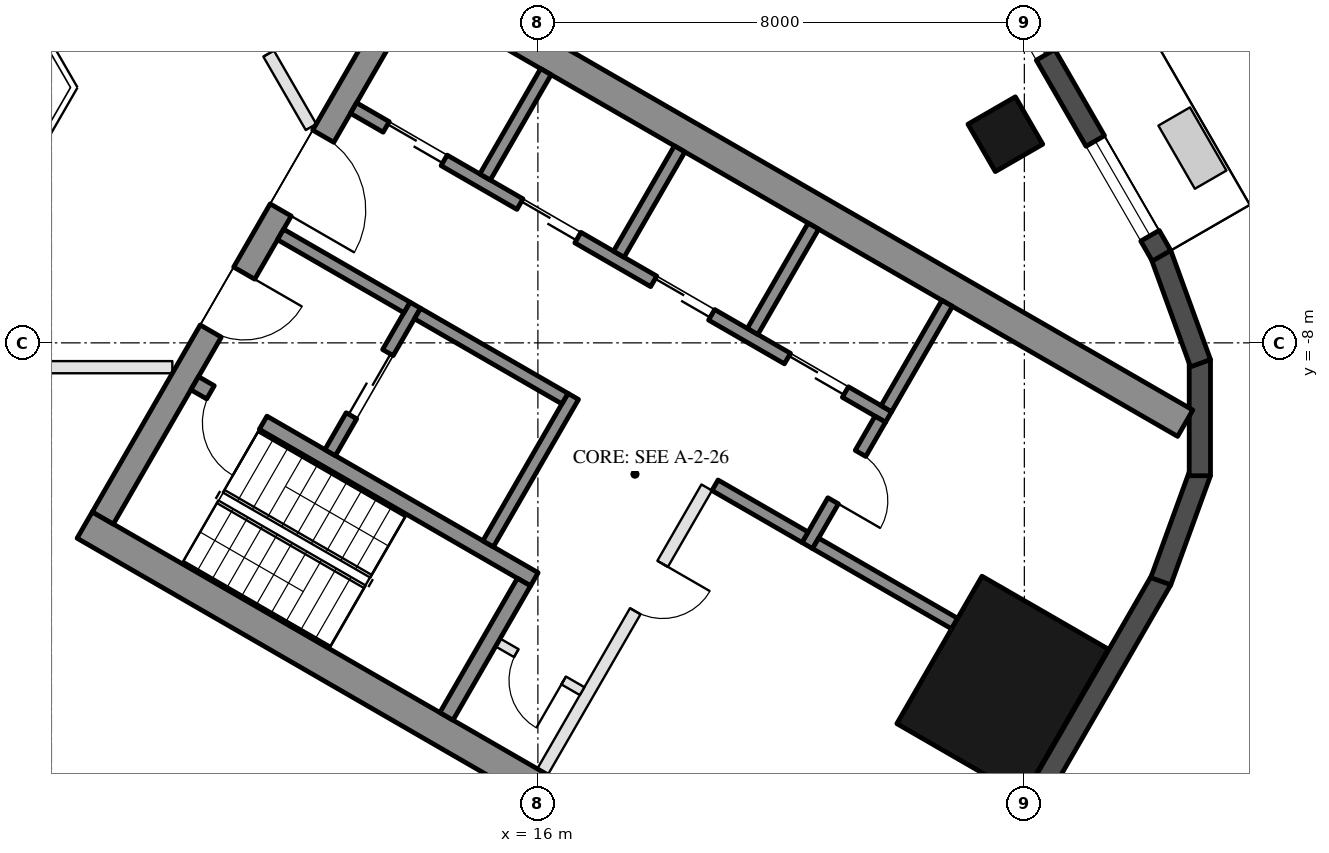
"""IFC4 building model, lengths in metres.
Left out: names, types, materials, properties, quantities, classifications, styles, units other than length and angle.
Written with IfcOpenShell. Run it as: python <this file> out.ifc"""

import sys

from ifc_helpers import new_model, si_unit, direction, frame, frame_2d, origin, origin_2d, place, context, subcontext, project, spatial, rectangle, hollow_rectangle, extrude, element, fill, save


model = new_model("IFC4")
c1 = context("Model", 3, precision=1e-05, world=origin(), true_north=direction((0.0, 1.0)))
c2 = subcontext(c1, "Body", "Model", "MODEL_VIEW")
j1 = project(units=[si_unit("LENGTHUNIT", "METRE"), si_unit("PLANEANGLEUNIT", "RADIAN")], contexts=[c1])
p1 = place(None, origin())
s1 = spatial("IfcSite", under=j1, at=p1, CompositionType="ELEMENT")
p2 = place(p1, origin())
s2 = spatial("IfcBuilding", under=s1, at=p2, CompositionType="ELEMENT")
p3 = place(p2, frame((0.0, 0.0, 116.8)))
s3 = spatial("IfcBuildingStorey", under=s2, at=p3, CompositionType="ELEMENT", Elevation=116.8)
p4 = place(p3, frame((23.688, -4.568, 0.0), z_axis=(0.0, 0.0, 1.0), x_axis=(-0.5, 0.866025403784, 0.0)))
e1 = element("IfcColumn", 1, at=p4, inside=s3, PredefinedType="COLUMN", context=c2, shape_type="SweptSolid", body=[
    extrude(hollow_rectangle(XDim=0.9, YDim=0.9, WallThickness=0.04, at=origin_2d()), origin(), (0.0, 0.0, 1.0), 3.7),
])
p5 = place(p3, frame((23.643, -13.65, 0.0), z_axis=(0.0, 0.0, 1.0), x_axis=(0.5, 0.866025403784, 0.0)))
e2 = element("IfcColumn", 2, at=p5, inside=s3, PredefinedType="COLUMN", context=c2, shape_type="SweptSolid", body=[
    extrude(hollow_rectangle(XDim=2.8, YDim=2.4, WallThickness=0.07, at=origin_2d()), origin(), (0.0, 0.0, 1.0), 3.7),
])
p6 = place(p3, frame((23.427, -16.792, 0.0), z_axis=(0.0, 0.0, 1.0), x_axis=(0.500018773155, 0.866014564827, 0.0)))
e3 = element("IfcWall", 3, at=p6, inside=s3, PredefinedType="SOLIDWALL", context=c2, shape_type="SweptSolid", body=[
    extrude(rectangle(XDim=5.658, YDim=0.35, at=frame_2d((2.829, 0.0))), origin(), (0.0, 0.0, 1.0), 3.55),
])
for number, where, z_axis, x_axis in (
    (4, (26.244, -11.92, 0.0), (0.0, 0.0, 1.0), (0.342, 0.94, 0.0)),
    (5, (26.886, -10.185, 0.0), (0.0, 0.0, 1.0), (0.0, 1.0, 0.0)),
    (6, (26.897, -8.335, 0.0), (0.0, 0.0, 1.0), (-0.342, 0.94, 0.0)),
):
    element("IfcWall", number, at=place(p3, frame(where, z_axis=z_axis, x_axis=x_axis)), inside=s3, PredefinedType="SOLIDWALL", context=c2, shape_type="SweptSolid", body=[
        extrude(rectangle(XDim=1.91, YDim=0.35, at=frame_2d((0.955, 0.0))), origin(), (0.0, 0.0, 1.0), 3.55),
    ])
p7 = place(p3, frame((26.257, -6.567, 0.0), z_axis=(0.0, 0.0, 1.0), x_axis=(-0.500023526245, 0.866011820475, 0.0)))
e7 = element("IfcWall", 7, at=p7, inside=s3, PredefinedType="SOLIDWALL", context=c2, shape_type="SweptSolid", body=[
    extrude(rectangle(XDim=11.816, YDim=0.35, at=frame_2d((5.908, 0.0))), origin(), (0.0, 0.0, 1.0), 3.55),
])
p8 = place(p7, frame((0.38, 0.0, 0.3)))
e8 = element("IfcOpeningElement", 8, at=p8, cuts=e7, PredefinedType="OPENING", context=c2, shape_type="SweptSolid", body=[
    extrude(rectangle(XDim=1.8, YDim=2.65, at=frame_2d((0.9, 1.325))), frame((0.0, 0.185, 0.0), z_axis=(0.0, -1.0, 0.0), x_axis=(1.0, 0.0, 0.0)), (0.0, 0.0, 1.0), 0.37),
])
p9 = place(p7, frame((7.716, 0.0, 0.0)))
e9 = element("IfcOpeningElement", 9, at=p9, cuts=e7, PredefinedType="OPENING", context=c2, shape_type="SweptSolid", body=[
    extrude(rectangle(XDim=2.4, YDim=2.4, at=frame_2d((1.2, 1.2))), frame((0.0, 0.185, 0.0), z_axis=(0.0, -1.0, 0.0), x_axis=(1.0, 0.0, 0.0)), (0.0, 0.0, 1.0), 0.37),
])
p10 = place(p7, frame((3.816, 0.0, 0.3)))
e10 = element("IfcOpeningElement", 10, at=p10, cuts=e7, PredefinedType="OPENING", context=c2, shape_type="SweptSolid", body=[
    extrude(rectangle(XDim=1.6, YDim=2.65, at=frame_2d((0.8, 1.325))), frame((0.0, 0.185, 0.0), z_axis=(0.0, -1.0, 0.0), x_axis=(1.0, 0.0, 0.0)), (0.0, 0.0, 1.0), 0.37),
])
p11 = place(p7, frame((5.716, 0.0, 0.3)))
e11 = element("IfcOpeningElement", 11, at=p11, cuts=e7, PredefinedType="OPENING", context=c2, shape_type="SweptSolid", body=[
    extrude(rectangle(XDim=1.6, YDim=2.65, at=frame_2d((0.8, 1.325))), frame((0.0, 0.185, 0.0), z_axis=(0.0, -1.0, 0.0), x_axis=(1.0, 0.0, 0.0)), (0.0, 0.0, 1.0), 0.37),
])
for number, where, z_axis, x_axis in (
    (12, (8.547, -10.997, 0.0), (0.0, 0.0, 1.0), (0.866, -0.5, 0.0)),
    (13, (13.797, -1.903, 0.0), (0.0, 0.0, 1.0), (0.866, -0.5, 0.0)),
):
    element("IfcWall", number, at=place(p3, frame(where, z_axis=z_axis, x_axis=x_axis)), inside=s3, PredefinedType="SHEAR", context=c2, shape_type="SweptSolid", body=[
        extrude(rectangle(XDim=14.837, YDim=0.5, at=frame_2d((7.418, 0.0))), origin(), (0.0, 0.0, 1.0), 3.5),
    ])
p12 = place(p3, frame((8.845, -10.88, 0.0), z_axis=(0.0, 0.0, 1.0), x_axis=(0.500004234368, 0.866022959057, 0.0)))
e14 = element("IfcWall", 14, at=p12, inside=s3, PredefinedType="SHEAR", context=c2, shape_type="SweptSolid", body=[
    extrude(rectangle(XDim=10.0, YDim=0.4, at=frame_2d((5.0, 0.0))), origin(), (0.0, 0.0, 1.0), 3.5),
])
p13 = place(p12, frame((3.55, 0.0, 0.0)))
e15 = element("IfcOpeningElement", 15, at=p13, cuts=e14, PredefinedType="OPENING", context=c2, shape_type="SweptSolid", body=[
    extrude(rectangle(XDim=1.1, YDim=2.1, at=frame_2d((0.55, 1.05))), frame((0.0, 0.21, 0.0), z_axis=(0.0, -1.0, 0.0), x_axis=(1.0, 0.0, 0.0)), (0.0, 0.0, 1.0), 0.42),
])
p14 = place(p12, frame((5.85, 0.0, 0.0)))
e16 = element("IfcOpeningElement", 16, at=p14, cuts=e14, PredefinedType="OPENING", context=c2, shape_type="SweptSolid", body=[
    extrude(rectangle(XDim=1.4, YDim=2.1, at=frame_2d((0.7, 1.05))), frame((0.0, 0.21, 0.0), z_axis=(0.0, -1.0, 0.0), x_axis=(1.0, 0.0, 0.0)), (0.0, 0.0, 1.0), 0.42),
])
p15 = place(p3, frame((10.356, -8.664, 0.0), z_axis=(0.0, 0.0, 1.0), x_axis=(0.866028629588, -0.499994412703, 0.0)))
e17 = element("IfcWall", 17, at=p15, inside=s3, PredefinedType="SHEAR", context=c2, shape_type="SweptSolid", body=[
    extrude(rectangle(XDim=6.45, YDim=0.25, at=frame_2d((3.225, 0.0))), origin(), (0.0, 0.0, 1.0), 3.5),
])
p16 = place(p15, frame((0.3, 0.0, 0.0)))
e18 = element("IfcOpeningElement", 18, at=p16, cuts=e17, PredefinedType="OPENING", context=c2, shape_type="SweptSolid", body=[
    extrude(rectangle(XDim=1.0, YDim=2.1, at=frame_2d((0.5, 1.05))), frame((0.0, 0.135, 0.0), z_axis=(0.0, -1.0, 0.0), x_axis=(1.0, 0.0, 0.0)), (0.0, 0.0, 1.0), 0.27),
])
p17 = place(p3, frame((14.496, -14.143, 0.0), z_axis=(0.0, 0.0, 1.0), x_axis=(0.500062241894, 0.865989465428, 0.0)))
e19 = element("IfcWall", 19, at=p17, inside=s3, PredefinedType="SHEAR", context=c2, shape_type="SweptSolid", body=[
    extrude(rectangle(XDim=2.55, YDim=0.25, at=frame_2d((1.275, 0.0))), origin(), (0.0, 0.0, 1.0), 3.5),
])
p18 = place(p3, frame((15.181, -11.305, 0.0), z_axis=(0.0, 0.0, 1.0), x_axis=(0.49994636267, 0.866056369097, 0.0)))
e20 = element("IfcWall", 20, at=p18, inside=s3, PredefinedType="SHEAR", context=c2, shape_type="SweptSolid", body=[
    extrude(rectangle(XDim=2.8, YDim=0.2, at=frame_2d((1.4, 0.0))), origin(), (0.0, 0.0, 1.0), 3.5),
])
p19 = place(p3, frame((12.583, -9.805, 0.0), z_axis=(0.0, 0.0, 1.0), x_axis=(0.49994636267, 0.866056369097, 0.0)))
e21 = element("IfcWall", 21, at=p19, inside=s3, PredefinedType="SHEAR", context=c2, shape_type="SweptSolid", body=[
    extrude(rectangle(XDim=2.8, YDim=0.2, at=frame_2d((1.4, 0.0))), origin(), (0.0, 0.0, 1.0), 3.5),
])
p20 = place(p19, frame((0.7, 0.0, 0.0)))
e22 = element("IfcOpeningElement", 22, at=p20, cuts=e21, PredefinedType="OPENING", context=c2, shape_type="SweptSolid", body=[
    extrude(rectangle(XDim=1.2, YDim=2.1, at=frame_2d((0.6, 1.05))), frame((0.0, 0.11, 0.0), z_axis=(0.0, -1.0, 0.0), x_axis=(1.0, 0.0, 0.0)), (0.0, 0.0, 1.0), 0.22),
])
p21 = place(p3, frame((11.768, -6.217, 0.0), z_axis=(0.0, 0.0, 1.0), x_axis=(0.866050077142, -0.499957262057, 0.0)))
e23 = element("IfcWall", 23, at=p21, inside=s3, PredefinedType="SHEAR", context=c2, shape_type="SweptSolid", body=[
    extrude(rectangle(XDim=2.4, YDim=0.2, at=frame_2d((1.2, 0.0))), origin(), (0.0, 0.0, 1.0), 3.5),
])
p22 = place(p3, frame((14.02, -7.517, 0.0), z_axis=(0.0, 0.0, 1.0), x_axis=(0.866034573852, -0.49998411664, 0.0)))
e24 = element("IfcWall", 24, at=p22, inside=s3, PredefinedType="SHEAR", context=c2, shape_type="SweptSolid", body=[
    extrude(rectangle(XDim=2.8, YDim=0.2, at=frame_2d((1.4, 0.0))), origin(), (0.0, 0.0, 1.0), 3.5),
])
p23 = place(p3, frame((12.968, -4.138, 0.0), z_axis=(0.0, 0.0, 1.0), x_axis=(0.866028328073, -0.49999493495, 0.0)))
e25 = element("IfcWall", 25, at=p23, inside=s3, PredefinedType="SHEAR", context=c2, shape_type="SweptSolid", body=[
    extrude(rectangle(XDim=10.16, YDim=0.2, at=frame_2d((5.08, 0.0))), origin(), (0.0, 0.0, 1.0), 3.5),
])
p24 = place(p23, frame((0.62, 0.0, 0.0)))
e26 = element("IfcOpeningElement", 26, at=p24, cuts=e25, PredefinedType="OPENING", context=c2, shape_type="SweptSolid", body=[
    extrude(rectangle(XDim=1.1, YDim=2.1, at=frame_2d((0.55, 1.05))), frame((0.0, 0.11, 0.0), z_axis=(0.0, -1.0, 0.0), x_axis=(1.0, 0.0, 0.0)), (0.0, 0.0, 1.0), 0.22),
])
p25 = place(p23, frame((3.16, 0.0, 0.0)))
e27 = element("IfcOpeningElement", 27, at=p25, cuts=e25, PredefinedType="OPENING", context=c2, shape_type="SweptSolid", body=[
    extrude(rectangle(XDim=1.1, YDim=2.1, at=frame_2d((0.55, 1.05))), frame((0.0, 0.11, 0.0), z_axis=(0.0, -1.0, 0.0), x_axis=(1.0, 0.0, 0.0)), (0.0, 0.0, 1.0), 0.22),
])
p26 = place(p23, frame((5.7, 0.0, 0.0)))
e28 = element("IfcOpeningElement", 28, at=p26, cuts=e25, PredefinedType="OPENING", context=c2, shape_type="SweptSolid", body=[
    extrude(rectangle(XDim=1.1, YDim=2.1, at=frame_2d((0.55, 1.05))), frame((0.0, 0.11, 0.0), z_axis=(0.0, -1.0, 0.0), x_axis=(1.0, 0.0, 0.0)), (0.0, 0.0, 1.0), 0.22),
])
p27 = place(p23, frame((8.24, 0.0, 0.0)))
e29 = element("IfcOpeningElement", 29, at=p27, cuts=e25, PredefinedType="OPENING", context=c2, shape_type="SweptSolid", body=[
    extrude(rectangle(XDim=1.1, YDim=2.1, at=frame_2d((0.55, 1.05))), frame((0.0, 0.11, 0.0), z_axis=(0.0, -1.0, 0.0), x_axis=(1.0, 0.0, 0.0)), (0.0, 0.0, 1.0), 0.22),
])
p28 = place(p3, frame((20.43, -11.333, 0.0), z_axis=(0.0, 0.0, 1.0), x_axis=(0.500001309137, 0.866024647952, 0.0)))
e30 = element("IfcWall", 30, at=p28, inside=s3, PredefinedType="SHEAR", context=c2, shape_type="SweptSolid", body=[
    extrude(rectangle(XDim=2.4, YDim=0.2, at=frame_2d((1.2, 0.0))), origin(), (0.0, 0.0, 1.0), 3.5),
])
p29 = place(p28, frame((0.85, 0.0, 0.0)))
e31 = element("IfcOpeningElement", 31, at=p29, cuts=e30, PredefinedType="OPENING", context=c2, shape_type="SweptSolid", body=[
    extrude(rectangle(XDim=0.9, YDim=2.1, at=frame_2d((0.45, 1.05))), frame((0.0, 0.11, 0.0), z_axis=(0.0, -1.0, 0.0), x_axis=(1.0, 0.0, 0.0)), (0.0, 0.0, 1.0), 0.22),
])
p30 = place(p3, frame((18.913, -10.342, 0.0), z_axis=(0.0, 0.0, 1.0), x_axis=(0.866038183914, -0.499977863513, 0.0)))
e32 = element("IfcWall", 32, at=p30, inside=s3, PredefinedType="SHEAR", context=c2, shape_type="SweptSolid", body=[
    extrude(rectangle(XDim=1.71, YDim=0.2, at=frame_2d((0.855, 0.0))), origin(), (0.0, 0.0, 1.0), 3.5),
])
for number, where, z_axis, x_axis in (
    (33, (15.131, -5.272, 0.0), (0.0, 0.0, 1.0), (0.5, 0.866, 0.0)),
    (34, (17.331, -6.542, 0.0), (0.0, 0.0, 1.0), (0.5, 0.866, 0.0)),
    (35, (19.531, -7.812, 0.0), (0.0, 0.0, 1.0), (0.5, 0.866, 0.0)),
    (36, (21.73, -9.082, 0.0), (0.0, 0.0, 1.0), (0.5, 0.866, 0.0)),
):
    element("IfcWall", number, at=place(p3, frame(where, z_axis=z_axis, x_axis=x_axis)), inside=s3, PredefinedType="SHEAR", context=c2, shape_type="SweptSolid", body=[
        extrude(rectangle(XDim=2.0, YDim=0.2, at=frame_2d((1.0, 0.0))), origin(), (0.0, 0.0, 1.0), 3.5),
    ])
p31 = place(p3, frame((20.567, -11.297, 0.0), z_axis=(0.0, 0.0, 1.0), x_axis=(0.866060851709, -0.499938597367, 0.0)))
e37 = element("IfcWall", 37, at=p31, inside=s3, PredefinedType="SHEAR", context=c2, shape_type="SweptSolid", body=[
    extrude(rectangle(XDim=2.64, YDim=0.2, at=frame_2d((1.32, 0.0))), origin(), (0.0, 0.0, 1.0), 3.5),
])
p32 = place(p3, frame((16.076, -15.055, 0.0), z_axis=(0.0, 0.0, 1.0), x_axis=(0.499995103361, 0.866028230842, 0.0)))
e38 = element("IfcWall", 38, at=p32, inside=s3, PredefinedType="PARTITIONING", context=c2, shape_type="SweptSolid", body=[
    extrude(rectangle(XDim=5.4, YDim=0.2, at=frame_2d((2.7, 0.0))), origin(), (0.0, 0.0, 1.0), 3.5),
])
p33 = place(p32, frame((3.05, 0.0, 0.0)))
e39 = element("IfcOpeningElement", 39, at=p33, cuts=e38, PredefinedType="OPENING", context=c2, shape_type="SweptSolid", body=[
    extrude(rectangle(XDim=0.9, YDim=2.1, at=frame_2d((0.45, 1.05))), frame((0.0, 0.11, 0.0), z_axis=(0.0, -1.0, 0.0), x_axis=(1.0, 0.0, 0.0)), (0.0, 0.0, 1.0), 0.22),
])
p34 = place(p3, frame((15.342, -12.928, 0.0), z_axis=(0.0, 0.0, 1.0), x_axis=(0.865989903783, -0.500061482766, 0.0)))
e40 = element("IfcWall", 40, at=p34, inside=s3, PredefinedType="PARTITIONING", context=c2, shape_type="SweptSolid", body=[
    extrude(rectangle(XDim=1.6, YDim=0.15, at=frame_2d((0.8, 0.0))), origin(), (0.0, 0.0, 1.0), 3.5),
])
p35 = place(p34, frame((0.35, 0.0, 0.0)))
e41 = element("IfcOpeningElement", 41, at=p35, cuts=e40, PredefinedType="OPENING", context=c2, shape_type="SweptSolid", body=[
    extrude(rectangle(XDim=0.9, YDim=2.1, at=frame_2d((0.45, 1.05))), frame((0.0, 0.085, 0.0), z_axis=(0.0, -1.0, 0.0), x_axis=(1.0, 0.0, 0.0)), (0.0, 0.0, 1.0), 0.17),
])
p36 = place(p3, frame((9.988, -8.4, 0.0), z_axis=(0.0, 0.0, 1.0), x_axis=(-1.0, 0.0, 0.0)))
e42 = element("IfcWall", 42, at=p36, inside=s3, PredefinedType="PARTITIONING", context=c2, shape_type="SweptSolid", body=[
    extrude(rectangle(XDim=9.989, YDim=0.2, at=frame_2d((4.995, 0.0))), origin(), (0.0, 0.0, 1.0), 2.95),
])
p37 = place(p36, frame((4.495, 0.0, 0.0)))
e43 = element("IfcOpeningElement", 43, at=p37, cuts=e42, PredefinedType="OPENING", context=c2, shape_type="SweptSolid", body=[
    extrude(rectangle(XDim=1.0, YDim=2.1, at=frame_2d((0.5, 1.05))), frame((0.0, 0.11, 0.0), z_axis=(0.0, -1.0, 0.0), x_axis=(1.0, 0.0, 0.0)), (0.0, 0.0, 1.0), 0.22),
])
p38 = place(p3, frame((10.375, -1.169, 0.0), z_axis=(0.0, 0.0, 1.0), x_axis=(0.500055316652, -0.865993464345, 0.0)))
e44 = element("IfcWall", 44, at=p38, inside=s3, PredefinedType="PARTITIONING", context=c2, shape_type="SweptSolid", body=[
    extrude(rectangle(XDim=3.788, YDim=0.2, at=frame_2d((1.894, 0.0))), origin(), (0.0, 0.0, 1.0), 2.95),
])
p39 = place(p38, frame((1.394, 0.0, 0.0)))
e45 = element("IfcOpeningElement", 45, at=p39, cuts=e44, PredefinedType="OPENING", context=c2, shape_type="SweptSolid", body=[
    extrude(rectangle(XDim=1.0, YDim=2.1, at=frame_2d((0.5, 1.05))), frame((0.0, 0.11, 0.0), z_axis=(0.0, -1.0, 0.0), x_axis=(1.0, 0.0, 0.0)), (0.0, 0.0, 1.0), 0.22),
])
p40 = place(p8, origin())
e46 = element("IfcWindow", 46, at=p40, inside=s3, PartitioningType="SINGLE_PANEL", PredefinedType="WINDOW", context=c2, shape_type="SweptSolid", body=[
    extrude(rectangle(XDim=1.8, YDim=2.65, at=frame_2d((0.9, 1.325))), frame((0.0, 0.03, 0.0), z_axis=(0.0, -1.0, 0.0), x_axis=(1.0, 0.0, 0.0)), (0.0, 0.0, 1.0), 0.06),
])
fill(e8, e46)
p41 = place(p10, origin())
e47 = element("IfcWindow", 47, at=p41, inside=s3, PartitioningType="SINGLE_PANEL", PredefinedType="WINDOW", context=c2, shape_type="SweptSolid", body=[
    extrude(rectangle(XDim=1.6, YDim=2.65, at=frame_2d((0.8, 1.325))), frame((0.0, 0.03, 0.0), z_axis=(0.0, -1.0, 0.0), x_axis=(1.0, 0.0, 0.0)), (0.0, 0.0, 1.0), 0.06),
])
fill(e10, e47)
p42 = place(p20, origin())
e48 = element("IfcDoor", 48, at=p42, inside=s3, OperationType="DOUBLE_DOOR_SLIDING", PredefinedType="DOOR", context=c2, shape_type="SweptSolid", body=[
    extrude(rectangle(XDim=1.2, YDim=2.1, at=frame_2d((0.6, 1.05))), frame((0.0, 0.025, 0.0), z_axis=(0.0, -1.0, 0.0), x_axis=(1.0, 0.0, 0.0)), (0.0, 0.0, 1.0), 0.05),
])
fill(e22, e48)
p43 = place(p35, frame((0.9, 0.0, 0.0), z_axis=(0.0, 0.0, 1.0), x_axis=(-1.0, 0.0, 0.0)))
e49 = element("IfcDoor", 49, at=p43, inside=s3, OperationType="SINGLE_SWING_LEFT", PredefinedType="DOOR", context=c2, shape_type="SweptSolid", body=[
    extrude(rectangle(XDim=0.9, YDim=2.1, at=frame_2d((0.45, 1.05))), frame((0.0, 0.025, 0.0), z_axis=(0.0, -1.0, 0.0), x_axis=(1.0, 0.0, 0.0)), (0.0, 0.0, 1.0), 0.05),
])
fill(e41, e49)
p44 = place(p24, origin())
e50 = element("IfcDoor", 50, at=p44, inside=s3, OperationType="DOUBLE_DOOR_SLIDING", PredefinedType="DOOR", context=c2, shape_type="SweptSolid", body=[
    extrude(rectangle(XDim=1.1, YDim=2.1, at=frame_2d((0.55, 1.05))), frame((0.0, 0.025, 0.0), z_axis=(0.0, -1.0, 0.0), x_axis=(1.0, 0.0, 0.0)), (0.0, 0.0, 1.0), 0.05),
])
fill(e26, e50)
p45 = place(p25, origin())
e51 = element("IfcDoor", 51, at=p45, inside=s3, OperationType="DOUBLE_DOOR_SLIDING", PredefinedType="DOOR", context=c2, shape_type="SweptSolid", body=[
    extrude(rectangle(XDim=1.1, YDim=2.1, at=frame_2d((0.55, 1.05))), frame((0.0, 0.025, 0.0), z_axis=(0.0, -1.0, 0.0), x_axis=(1.0, 0.0, 0.0)), (0.0, 0.0, 1.0), 0.05),
])
fill(e27, e51)
p46 = place(p26, origin())
e52 = element("IfcDoor", 52, at=p46, inside=s3, OperationType="DOUBLE_DOOR_SLIDING", PredefinedType="DOOR", context=c2, shape_type="SweptSolid", body=[
    extrude(rectangle(XDim=1.1, YDim=2.1, at=frame_2d((0.55, 1.05))), frame((0.0, 0.025, 0.0), z_axis=(0.0, -1.0, 0.0), x_axis=(1.0, 0.0, 0.0)), (0.0, 0.0, 1.0), 0.05),
])
fill(e28, e52)
p47 = place(p27, origin())
e53 = element("IfcDoor", 53, at=p47, inside=s3, OperationType="DOUBLE_DOOR_SLIDING", PredefinedType="DOOR", context=c2, shape_type="SweptSolid", body=[
    extrude(rectangle(XDim=1.1, YDim=2.1, at=frame_2d((0.55, 1.05))), frame((0.0, 0.025, 0.0), z_axis=(0.0, -1.0, 0.0), x_axis=(1.0, 0.0, 0.0)), (0.0, 0.0, 1.0), 0.05),
])
fill(e29, e53)
p48 = place(p29, frame((0.9, 0.0, 0.0), z_axis=(0.0, 0.0, 1.0), x_axis=(-1.0, 0.0, 0.0)))
e54 = element("IfcDoor", 54, at=p48, inside=s3, OperationType="SINGLE_SWING_RIGHT", PredefinedType="DOOR", context=c2, shape_type="SweptSolid", body=[
    extrude(rectangle(XDim=0.9, YDim=2.1, at=frame_2d((0.45, 1.05))), frame((0.0, 0.025, 0.0), z_axis=(0.0, -1.0, 0.0), x_axis=(1.0, 0.0, 0.0)), (0.0, 0.0, 1.0), 0.05),
])
fill(e31, e54)
p49 = place(p33, frame((0.9, 0.0, 0.0), z_axis=(0.0, 0.0, 1.0), x_axis=(-1.0, 0.0, 0.0)))
e55 = element("IfcDoor", 55, at=p49, inside=s3, OperationType="SINGLE_SWING_LEFT", PredefinedType="DOOR", context=c2, shape_type="SweptSolid", body=[
    extrude(rectangle(XDim=0.9, YDim=2.1, at=frame_2d((0.45, 1.05))), frame((0.0, 0.025, 0.0), z_axis=(0.0, -1.0, 0.0), x_axis=(1.0, 0.0, 0.0)), (0.0, 0.0, 1.0), 0.05),
])
fill(e39, e55)
p50 = place(p13, frame((1.1, 0.0, 0.0), z_axis=(0.0, 0.0, 1.0), x_axis=(-1.0, 0.0, 0.0)))
e56 = element("IfcDoor", 56, at=p50, inside=s3, OperationType="SINGLE_SWING_LEFT", PredefinedType="DOOR", context=c2, shape_type="SweptSolid", body=[
    extrude(rectangle(XDim=1.1, YDim=2.1, at=frame_2d((0.55, 1.05))), frame((0.0, 0.025, 0.0), z_axis=(0.0, -1.0, 0.0), x_axis=(1.0, 0.0, 0.0)), (0.0, 0.0, 1.0), 0.05),
])
fill(e15, e56)
p51 = place(p14, frame((1.4, 0.0, 0.0), z_axis=(0.0, 0.0, 1.0), x_axis=(-1.0, 0.0, 0.0)))
e57 = element("IfcDoor", 57, at=p51, inside=s3, OperationType="DOUBLE_DOOR_SINGLE_SWING", PredefinedType="DOOR", context=c2, shape_type="SweptSolid", body=[
    extrude(rectangle(XDim=1.4, YDim=2.1, at=frame_2d((0.7, 1.05))), frame((0.0, 0.025, 0.0), z_axis=(0.0, -1.0, 0.0), x_axis=(1.0, 0.0, 0.0)), (0.0, 0.0, 1.0), 0.05),
])
fill(e16, e57)
p52 = place(p16, frame((1.0, 0.0, 0.0), z_axis=(0.0, 0.0, 1.0), x_axis=(-1.0, 0.0, 0.0)))
e58 = element("IfcDoor", 58, at=p52, inside=s3, OperationType="SINGLE_SWING_LEFT", PredefinedType="DOOR", context=c2, shape_type="SweptSolid", body=[
    extrude(rectangle(XDim=1.0, YDim=2.1, at=frame_2d((0.5, 1.05))), frame((0.0, 0.025, 0.0), z_axis=(0.0, -1.0, 0.0), x_axis=(1.0, 0.0, 0.0)), (0.0, 0.0, 1.0), 0.05),
])
fill(e18, e58)
p53 = place(p39, origin())
e59 = element("IfcDoor", 59, at=p53, inside=s3, OperationType="SINGLE_SWING_LEFT", PredefinedType="DOOR", context=c2, shape_type="SweptSolid", body=[
    extrude(rectangle(XDim=1.0, YDim=2.1, at=frame_2d((0.5, 1.05))), frame((0.0, 0.025, 0.0), z_axis=(0.0, -1.0, 0.0), x_axis=(1.0, 0.0, 0.0)), (0.0, 0.0, 1.0), 0.05),
])
fill(e45, e59)
save(model, sys.argv[1])
